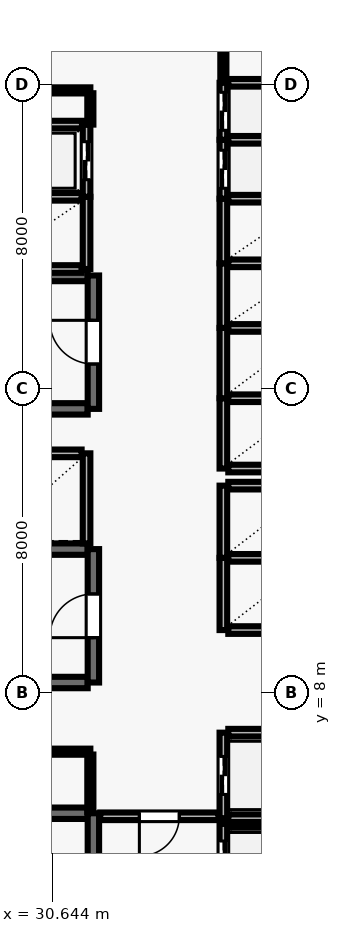
"""IFC4 building model, lengths in metres.
Left out: names, types, materials, properties, quantities, classifications, styles, units other than length and angle.
Written with IfcOpenShell. Run it as: python <this file> out.ifc"""

import sys

from ifc_helpers import new_model, si_unit, direction, frame, frame_2d, origin, place, context, subcontext, project, spatial, rectangle, extrude, element, fill, save


model = new_model("IFC4")
c1 = context("Model", 3, precision=1e-05, world=origin(), true_north=direction((0.0, 1.0)))
c2 = subcontext(c1, "Body", "Model", "MODEL_VIEW")
j1 = project(units=[si_unit("LENGTHUNIT", "METRE"), si_unit("PLANEANGLEUNIT", "RADIAN")], contexts=[c1])
p1 = place(None, origin())
s1 = spatial("IfcSite", under=j1, at=p1, CompositionType="ELEMENT")
p2 = place(p1, origin())
s2 = spatial("IfcBuilding", under=s1, at=p2, CompositionType="ELEMENT")
p3 = place(p2, frame((0.0, 0.0, 66.1)))
s3 = spatial("IfcBuildingStorey", under=s2, at=p3, CompositionType="ELEMENT", Elevation=66.1)
p4 = place(p3, frame((31.58, 4.83, 0.0), z_axis=(0.0, 0.0, 1.0), x_axis=(-1.0, 0.0, 0.0)))
e1 = element("IfcWall", 1, at=p4, inside=s3, PredefinedType="SHEAR", context=c2, shape_type="SweptSolid", body=[
    extrude(rectangle(XDim=8.36, YDim=0.3, at=frame_2d((4.18, 0.0))), origin(), (0.0, 0.0, 1.0), 3.69),
])
p5 = place(p3, frame((31.73, 0.96, 0.0), z_axis=(0.0, 0.0, 1.0), x_axis=(0.0, 1.0, 0.0)))
e2 = element("IfcWall", 2, at=p5, inside=s3, PredefinedType="SHEAR", context=c2, shape_type="SweptSolid", body=[
    extrude(rectangle(XDim=3.87, YDim=0.3, at=frame_2d((1.935, 0.0))), origin(), (0.0, 0.0, 1.0), 3.69),
])
p6 = place(p5, frame((1.54, 0.0, 0.0)))
e3 = element("IfcOpeningElement", 3, at=p6, cuts=e2, PredefinedType="OPENING", context=c2, shape_type="SweptSolid", body=[
    extrude(rectangle(XDim=1.15, YDim=2.15, at=frame_2d((0.575, 1.075))), frame((0.0, 0.16, 0.0), z_axis=(0.0, -1.0, 0.0), x_axis=(1.0, 0.0, 0.0)), (0.0, 0.0, 1.0), 0.32),
])
for number, where, z_axis, x_axis in (
    (4, (31.58, 18.98, 0.0), (0.0, 0.0, 1.0), (-1.0, 0.0, 0.0)),
    (5, (23.22, 15.47, 0.0), (0.0, 0.0, 1.0), (1.0, 0.0, 0.0)),
):
    element("IfcWall", number, at=place(p3, frame(where, z_axis=z_axis, x_axis=x_axis)), inside=s3, PredefinedType="SHEAR", context=c2, shape_type="SweptSolid", body=[
        extrude(rectangle(XDim=8.36, YDim=0.3, at=frame_2d((4.18, 0.0))), origin(), (0.0, 0.0, 1.0), 3.69),
    ])
p7 = place(p3, frame((31.73, 15.47, 0.0), z_axis=(0.0, 0.0, 1.0), x_axis=(0.0, 1.0, 0.0)))
e6 = element("IfcWall", 6, at=p7, inside=s3, PredefinedType="SHEAR", context=c2, shape_type="SweptSolid", body=[
    extrude(rectangle(XDim=3.51, YDim=0.3, at=frame_2d((1.755, 0.0))), origin(), (0.0, 0.0, 1.0), 3.69),
])
p8 = place(p7, frame((1.18, 0.0, 0.0)))
e7 = element("IfcOpeningElement", 7, at=p8, cuts=e6, PredefinedType="OPENING", context=c2, shape_type="SweptSolid", body=[
    extrude(rectangle(XDim=1.15, YDim=2.15, at=frame_2d((0.575, 1.075))), frame((0.0, 0.16, 0.0), z_axis=(0.0, -1.0, 0.0), x_axis=(1.0, 0.0, 0.0)), (0.0, 0.0, 1.0), 0.32),
])
for number, where, z_axis, x_axis in (
    (8, (31.58, 11.78, 0.0), (0.0, 0.0, 1.0), (-1.0, 0.0, 0.0)),
    (9, (23.22, 8.27, 0.0), (0.0, 0.0, 1.0), (1.0, 0.0, 0.0)),
):
    element("IfcWall", number, at=place(p3, frame(where, z_axis=z_axis, x_axis=x_axis)), inside=s3, PredefinedType="SHEAR", context=c2, shape_type="SweptSolid", body=[
        extrude(rectangle(XDim=8.36, YDim=0.3, at=frame_2d((4.18, 0.0))), origin(), (0.0, 0.0, 1.0), 3.69),
    ])
p9 = place(p3, frame((31.73, 8.27, 0.0), z_axis=(0.0, 0.0, 1.0), x_axis=(0.0, 1.0, 0.0)))
e10 = element("IfcWall", 10, at=p9, inside=s3, PredefinedType="SHEAR", context=c2, shape_type="SweptSolid", body=[
    extrude(rectangle(XDim=3.51, YDim=0.3, at=frame_2d((1.755, 0.0))), origin(), (0.0, 0.0, 1.0), 3.69),
])
p10 = place(p9, frame((1.18, 0.0, 0.0)))
e11 = element("IfcOpeningElement", 11, at=p10, cuts=e10, PredefinedType="OPENING", context=c2, shape_type="SweptSolid", body=[
    extrude(rectangle(XDim=1.15, YDim=2.15, at=frame_2d((0.575, 1.075))), frame((0.0, 0.16, 0.0), z_axis=(0.0, -1.0, 0.0), x_axis=(1.0, 0.0, 0.0)), (0.0, 0.0, 1.0), 0.32),
])
p11 = place(p3, frame((35.15, 4.55, 0.0), z_axis=(0.0, 0.0, 1.0), x_axis=(0.0, -1.0, 0.0)))
e12 = element("IfcWall", 12, at=p11, inside=s3, PredefinedType="SOLIDWALL", context=c2, shape_type="SweptSolid", body=[
    extrude(rectangle(XDim=2.1, YDim=0.2, at=frame_2d((1.05, 0.0))), origin(), (0.0, 0.0, 1.0), 3.69),
])
p12 = place(p11, frame((0.45, 0.0, 0.0)))
e13 = element("IfcOpeningElement", 13, at=p12, cuts=e12, PredefinedType="OPENING", context=c2, shape_type="SweptSolid", body=[
    extrude(rectangle(XDim=1.2, YDim=2.15, at=frame_2d((0.6, 1.075))), frame((0.0, 0.11, 0.0), z_axis=(0.0, -1.0, 0.0), x_axis=(1.0, 0.0, 0.0)), (0.0, 0.0, 1.0), 0.22),
])
p13 = place(p3, frame((37.42, 4.55, 0.0), z_axis=(0.0, 0.0, 1.0), x_axis=(-1.0, 0.0, 0.0)))
e14 = element("IfcWall", 14, at=p13, inside=s3, PredefinedType="SOLIDWALL", context=c2, shape_type="SweptSolid", body=[
    extrude(rectangle(XDim=2.14, YDim=0.2, at=frame_2d((1.07, 0.0))), origin(), (0.0, 0.0, 1.0), 3.69),
])
p14 = place(p3, frame((35.15, 6.95, 0.0), z_axis=(0.0, 0.0, 1.0), x_axis=(0.0, -1.0, 0.0)))
e15 = element("IfcWall", 15, at=p14, inside=s3, PredefinedType="SOLIDWALL", context=c2, shape_type="SweptSolid", body=[
    extrude(rectangle(XDim=2.25, YDim=0.2, at=frame_2d((1.125, 0.0))), origin(), (0.0, 0.0, 1.0), 3.69),
])
p15 = place(p14, frame((0.625, 0.0, 0.0)))
e16 = element("IfcOpeningElement", 16, at=p15, cuts=e15, PredefinedType="OPENING", context=c2, shape_type="SweptSolid", body=[
    extrude(rectangle(XDim=1.0, YDim=2.1, at=frame_2d((0.5, 1.05))), frame((0.0, 0.11, 0.0), z_axis=(0.0, -1.0, 0.0), x_axis=(1.0, 0.0, 0.0)), (0.0, 0.0, 1.0), 0.22),
])
for number, where, z_axis, x_axis in (
    (17, (35.28, 4.7, 0.0), (0.0, 0.0, 1.0), (1.0, 0.0, 0.0)),
    (18, (37.42, 6.95, 0.0), (0.0, 0.0, 1.0), (-1.0, 0.0, 0.0)),
):
    element("IfcWall", number, at=place(p3, frame(where, z_axis=z_axis, x_axis=x_axis)), inside=s3, PredefinedType="SOLIDWALL", context=c2, shape_type="SweptSolid", body=[
        extrude(rectangle(XDim=2.14, YDim=0.2, at=frame_2d((1.07, 0.0))), origin(), (0.0, 0.0, 1.0), 3.69),
    ])
p16 = place(p3, frame((35.15, 11.55, 0.0), z_axis=(0.0, 0.0, 1.0), x_axis=(0.0, -1.0, 0.0)))
e19 = element("IfcWall", 19, at=p16, inside=s3, PredefinedType="SOLIDWALL", context=c2, shape_type="SweptSolid", body=[
    extrude(rectangle(XDim=1.9, YDim=0.2, at=frame_2d((0.95, 0.0))), origin(), (0.0, 0.0, 1.0), 3.69),
])
for number, where, z_axis, x_axis in (
    (20, (35.28, 9.65, 0.0), (0.0, 0.0, 1.0), (1.0, 0.0, 0.0)),
    (21, (37.42, 11.55, 0.0), (0.0, 0.0, 1.0), (-1.0, 0.0, 0.0)),
):
    element("IfcWall", number, at=place(p3, frame(where, z_axis=z_axis, x_axis=x_axis)), inside=s3, PredefinedType="SOLIDWALL", context=c2, shape_type="SweptSolid", body=[
        extrude(rectangle(XDim=2.14, YDim=0.2, at=frame_2d((1.07, 0.0))), origin(), (0.0, 0.0, 1.0), 3.69),
    ])
p17 = place(p3, frame((35.15, 13.45, 0.0), z_axis=(0.0, 0.0, 1.0), x_axis=(0.0, -1.0, 0.0)))
e22 = element("IfcWall", 22, at=p17, inside=s3, PredefinedType="SOLIDWALL", context=c2, shape_type="SweptSolid", body=[
    extrude(rectangle(XDim=1.9, YDim=0.2, at=frame_2d((0.95, 0.0))), origin(), (0.0, 0.0, 1.0), 3.69),
])
p18 = place(p3, frame((37.42, 13.45, 0.0), z_axis=(0.0, 0.0, 1.0), x_axis=(-1.0, 0.0, 0.0)))
e23 = element("IfcWall", 23, at=p18, inside=s3, PredefinedType="SOLIDWALL", context=c2, shape_type="SweptSolid", body=[
    extrude(rectangle(XDim=2.14, YDim=0.2, at=frame_2d((1.07, 0.0))), origin(), (0.0, 0.0, 1.0), 3.69),
])
p19 = place(p3, frame((31.55, 11.93, 0.0), z_axis=(0.0, 0.0, 1.0), x_axis=(0.0, 1.0, 0.0)))
e24 = element("IfcWall", 24, at=p19, inside=s3, PredefinedType="SOLIDWALL", context=c2, shape_type="SweptSolid", body=[
    extrude(rectangle(XDim=2.37, YDim=0.2, at=frame_2d((1.185, 0.0))), origin(), (0.0, 0.0, 1.0), 3.69),
])
p20 = place(p3, frame((31.42, 14.3, 0.0), z_axis=(0.0, 0.0, 1.0), x_axis=(-1.0, 0.0, 0.0)))
e25 = element("IfcWall", 25, at=p20, inside=s3, PredefinedType="SOLIDWALL", context=c2, shape_type="SweptSolid", body=[
    extrude(rectangle(XDim=2.44, YDim=0.2, at=frame_2d((1.22, 0.0))), origin(), (0.0, 0.0, 1.0), 3.69),
])
p21 = place(p3, frame((35.15, 15.75, 0.0), z_axis=(0.0, 0.0, 1.0), x_axis=(0.0, -1.0, 0.0)))
e26 = element("IfcWall", 26, at=p21, inside=s3, PredefinedType="SOLIDWALL", context=c2, shape_type="SweptSolid", body=[
    extrude(rectangle(XDim=1.85, YDim=0.2, at=frame_2d((0.925, 0.0))), origin(), (0.0, 0.0, 1.0), 3.69),
])
for number, where, z_axis, x_axis in (
    (27, (35.28, 13.9, 0.0), (0.0, 0.0, 1.0), (1.0, 0.0, 0.0)),
    (28, (37.42, 15.75, 0.0), (0.0, 0.0, 1.0), (-1.0, 0.0, 0.0)),
):
    element("IfcWall", number, at=place(p3, frame(where, z_axis=z_axis, x_axis=x_axis)), inside=s3, PredefinedType="SOLIDWALL", context=c2, shape_type="SweptSolid", body=[
        extrude(rectangle(XDim=2.14, YDim=0.2, at=frame_2d((1.07, 0.0))), origin(), (0.0, 0.0, 1.0), 3.69),
    ])
p22 = place(p3, frame((35.15, 17.6, 0.0), z_axis=(0.0, 0.0, 1.0), x_axis=(0.0, -1.0, 0.0)))
e29 = element("IfcWall", 29, at=p22, inside=s3, PredefinedType="SOLIDWALL", context=c2, shape_type="SweptSolid", body=[
    extrude(rectangle(XDim=1.85, YDim=0.2, at=frame_2d((0.925, 0.0))), origin(), (0.0, 0.0, 1.0), 3.69),
])
p23 = place(p3, frame((37.42, 17.6, 0.0), z_axis=(0.0, 0.0, 1.0), x_axis=(-1.0, 0.0, 0.0)))
e30 = element("IfcWall", 30, at=p23, inside=s3, PredefinedType="SOLIDWALL", context=c2, shape_type="SweptSolid", body=[
    extrude(rectangle(XDim=2.14, YDim=0.2, at=frame_2d((1.07, 0.0))), origin(), (0.0, 0.0, 1.0), 3.69),
])
p24 = place(p3, frame((35.15, 19.3, 0.0), z_axis=(0.0, 0.0, 1.0), x_axis=(0.0, -1.0, 0.0)))
e31 = element("IfcWall", 31, at=p24, inside=s3, PredefinedType="SOLIDWALL", context=c2, shape_type="SweptSolid", body=[
    extrude(rectangle(XDim=1.7, YDim=0.2, at=frame_2d((0.85, 0.0))), origin(), (0.0, 0.0, 1.0), 3.69),
])
p25 = place(p3, frame((37.42, 19.3, 0.0), z_axis=(0.0, 0.0, 1.0), x_axis=(-1.0, 0.0, 0.0)))
e32 = element("IfcWall", 32, at=p25, inside=s3, PredefinedType="SOLIDWALL", context=c2, shape_type="SweptSolid", body=[
    extrude(rectangle(XDim=2.14, YDim=0.2, at=frame_2d((1.07, 0.0))), origin(), (0.0, 0.0, 1.0), 3.69),
])
p26 = place(p3, frame((35.15, 21.0, 0.0), z_axis=(0.0, 0.0, 1.0), x_axis=(0.0, -1.0, 0.0)))
e33 = element("IfcWall", 33, at=p26, inside=s3, PredefinedType="SOLIDWALL", context=c2, shape_type="SweptSolid", body=[
    extrude(rectangle(XDim=1.7, YDim=0.2, at=frame_2d((0.85, 0.0))), origin(), (0.0, 0.0, 1.0), 3.69),
])
p27 = place(p3, frame((37.42, 21.0, 0.0), z_axis=(0.0, 0.0, 1.0), x_axis=(-1.0, 0.0, 0.0)))
e34 = element("IfcWall", 34, at=p27, inside=s3, PredefinedType="SOLIDWALL", context=c2, shape_type="SweptSolid", body=[
    extrude(rectangle(XDim=2.14, YDim=0.2, at=frame_2d((1.07, 0.0))), origin(), (0.0, 0.0, 1.0), 3.69),
])
p28 = place(p3, frame((31.55, 19.15, 0.0), z_axis=(0.0, 0.0, 1.0), x_axis=(0.0, 1.0, 0.0)))
e35 = element("IfcWall", 35, at=p28, inside=s3, PredefinedType="SOLIDWALL", context=c2, shape_type="SweptSolid", body=[
    extrude(rectangle(XDim=1.9, YDim=0.2, at=frame_2d((0.95, 0.0))), origin(), (0.0, 0.0, 1.0), 3.69),
])
for number, where, z_axis, x_axis in (
    (36, (28.98, 19.15, 0.0), (0.0, 0.0, 1.0), (1.0, 0.0, 0.0)),
    (37, (31.42, 21.05, 0.0), (0.0, 0.0, 1.0), (-1.0, 0.0, 0.0)),
):
    element("IfcWall", number, at=place(p3, frame(where, z_axis=z_axis, x_axis=x_axis)), inside=s3, PredefinedType="SOLIDWALL", context=c2, shape_type="SweptSolid", body=[
        extrude(rectangle(XDim=2.44, YDim=0.2, at=frame_2d((1.22, 0.0))), origin(), (0.0, 0.0, 1.0), 3.69),
    ])
p29 = place(p3, frame((35.15, 22.55, 0.0), z_axis=(0.0, 0.0, 1.0), x_axis=(0.0, -1.0, 0.0)))
e38 = element("IfcWall", 38, at=p29, inside=s3, PredefinedType="SOLIDWALL", context=c2, shape_type="SweptSolid", body=[
    extrude(rectangle(XDim=1.55, YDim=0.2, at=frame_2d((0.775, 0.0))), origin(), (0.0, 0.0, 1.0), 3.69),
])
p30 = place(p29, frame((0.275, 0.0, 0.0)))
e39 = element("IfcOpeningElement", 39, at=p30, cuts=e38, PredefinedType="OPENING", context=c2, shape_type="SweptSolid", body=[
    extrude(rectangle(XDim=1.0, YDim=2.1, at=frame_2d((0.5, 1.05))), frame((0.0, 0.11, 0.0), z_axis=(0.0, -1.0, 0.0), x_axis=(1.0, 0.0, 0.0)), (0.0, 0.0, 1.0), 0.22),
])
p31 = place(p3, frame((37.42, 22.55, 0.0), z_axis=(0.0, 0.0, 1.0), x_axis=(-1.0, 0.0, 0.0)))
e40 = element("IfcWall", 40, at=p31, inside=s3, PredefinedType="SOLIDWALL", context=c2, shape_type="SweptSolid", body=[
    extrude(rectangle(XDim=2.14, YDim=0.2, at=frame_2d((1.07, 0.0))), origin(), (0.0, 0.0, 1.0), 3.69),
])
p32 = place(p3, frame((35.15, 24.05, 0.0), z_axis=(0.0, 0.0, 1.0), x_axis=(0.0, -1.0, 0.0)))
e41 = element("IfcWall", 41, at=p32, inside=s3, PredefinedType="SOLIDWALL", context=c2, shape_type="SweptSolid", body=[
    extrude(rectangle(XDim=1.5, YDim=0.2, at=frame_2d((0.75, 0.0))), origin(), (0.0, 0.0, 1.0), 3.69),
])
p33 = place(p32, frame((0.25, 0.0, 0.0)))
e42 = element("IfcOpeningElement", 42, at=p33, cuts=e41, PredefinedType="OPENING", context=c2, shape_type="SweptSolid", body=[
    extrude(rectangle(XDim=1.0, YDim=2.1, at=frame_2d((0.5, 1.05))), frame((0.0, 0.11, 0.0), z_axis=(0.0, -1.0, 0.0), x_axis=(1.0, 0.0, 0.0)), (0.0, 0.0, 1.0), 0.22),
])
p34 = place(p3, frame((37.42, 24.05, 0.0), z_axis=(0.0, 0.0, 1.0), x_axis=(-1.0, 0.0, 0.0)))
e43 = element("IfcWall", 43, at=p34, inside=s3, PredefinedType="SOLIDWALL", context=c2, shape_type="SweptSolid", body=[
    extrude(rectangle(XDim=2.14, YDim=0.2, at=frame_2d((1.07, 0.0))), origin(), (0.0, 0.0, 1.0), 3.69),
])
p35 = place(p3, frame((31.55, 21.05, 0.0), z_axis=(0.0, 0.0, 1.0), x_axis=(0.0, 1.0, 0.0)))
e44 = element("IfcWall", 44, at=p35, inside=s3, PredefinedType="SOLIDWALL", context=c2, shape_type="SweptSolid", body=[
    extrude(rectangle(XDim=1.9, YDim=0.2, at=frame_2d((0.95, 0.0))), origin(), (0.0, 0.0, 1.0), 3.69),
])
p36 = place(p35, frame((0.45, 0.0, 0.0)))
e45 = element("IfcOpeningElement", 45, at=p36, cuts=e44, PredefinedType="OPENING", context=c2, shape_type="SweptSolid", body=[
    extrude(rectangle(XDim=1.0, YDim=2.1, at=frame_2d((0.5, 1.05))), frame((0.0, 0.11, 0.0), z_axis=(0.0, -1.0, 0.0), x_axis=(1.0, 0.0, 0.0)), (0.0, 0.0, 1.0), 0.22),
])
p37 = place(p3, frame((31.43, 22.95, 0.0), z_axis=(0.0, 0.0, 1.0), x_axis=(-1.0, 0.0, 0.0)))
e46 = element("IfcWall", 46, at=p37, inside=s3, PredefinedType="SOLIDWALL", context=c2, shape_type="SweptSolid", body=[
    extrude(rectangle(XDim=2.46, YDim=0.2, at=frame_2d((1.23, 0.0))), origin(), (0.0, 0.0, 1.0), 3.69),
])
p38 = place(p3, frame((28.55, 6.45, 0.0), z_axis=(0.0, 0.0, 1.0), x_axis=(1.0, 0.0, 0.0)))
e47 = element("IfcWall", 47, at=p38, inside=s3, PredefinedType="PARTITIONING", context=c2, shape_type="SweptSolid", body=[
    extrude(rectangle(XDim=3.1, YDim=0.16, at=frame_2d((1.55, 0.0))), origin(), (0.0, 0.0, 1.0), 3.69),
])
p39 = place(p38, frame((1.11, 0.0, 0.0)))
e48 = element("IfcOpeningElement", 48, at=p39, cuts=e47, PredefinedType="OPENING", context=c2, shape_type="SweptSolid", body=[
    extrude(rectangle(XDim=0.88, YDim=2.1, at=frame_2d((0.44, 1.05))), frame((0.0, 0.09, 0.0), z_axis=(0.0, -1.0, 0.0), x_axis=(1.0, 0.0, 0.0)), (0.0, 0.0, 1.0), 0.18),
])
p40 = place(p3, frame((28.8, 23.85, 0.0), z_axis=(0.0, 0.0, 1.0), x_axis=(1.0, 0.0, 0.0)))
e49 = element("IfcWall", 49, at=p40, inside=s3, PredefinedType="PARTITIONING", context=c2, shape_type="SweptSolid", body=[
    extrude(rectangle(XDim=2.85, YDim=0.16, at=frame_2d((1.425, 0.0))), origin(), (0.0, 0.0, 1.0), 3.69),
])
p41 = place(p3, frame((35.02, 4.75, 0.0), z_axis=(0.0, 0.0, 1.0), x_axis=(-1.0, 0.0, 0.0)))
e50 = element("IfcWall", 50, at=p41, inside=s3, PredefinedType="SOLIDWALL", context=c2, shape_type="SweptSolid", body=[
    extrude(rectangle(XDim=3.11, YDim=0.2, at=frame_2d((1.555, 0.0))), origin(), (0.0, 0.0, 1.0), 3.69),
])
p42 = place(p41, frame((1.03, 0.0, 0.0)))
e51 = element("IfcOpeningElement", 51, at=p42, cuts=e50, PredefinedType="OPENING", context=c2, shape_type="SweptSolid", body=[
    extrude(rectangle(XDim=1.05, YDim=2.15, at=frame_2d((0.525, 1.075))), frame((0.0, 0.11, 0.0), z_axis=(0.0, -1.0, 0.0), x_axis=(1.0, 0.0, 0.0)), (0.0, 0.0, 1.0), 0.22),
])
p43 = place(p3, frame((31.65, 4.86, 0.0), z_axis=(0.0, 0.0, 1.0), x_axis=(0.0, 1.0, 0.0)))
e52 = element("IfcWall", 52, at=p43, inside=s3, PredefinedType="PARTITIONING", context=c2, shape_type="SweptSolid", body=[
    extrude(rectangle(XDim=1.515, YDim=0.16, at=frame_2d((0.757, 0.0))), origin(), (0.0, 0.0, 1.0), 3.69),
])
p44 = place(p3, frame((31.65, 23.775, 0.0), z_axis=(0.0, 0.0, 1.0), x_axis=(0.0, -1.0, 0.0)))
e53 = element("IfcWall", 53, at=p44, inside=s3, PredefinedType="PARTITIONING", context=c2, shape_type="SweptSolid", body=[
    extrude(rectangle(XDim=0.825, YDim=0.16, at=frame_2d((0.413, 0.0))), origin(), (0.0, 0.0, 1.0), 3.69),
])
p45 = place(p3, frame((35.15, 24.07, 0.0), z_axis=(0.0, 0.0, 1.0), x_axis=(0.0, 1.0, 0.0)))
e54 = element("IfcWall", 54, at=p45, inside=s3, PredefinedType="PARTITIONING", context=c2, shape_type="SweptSolid", body=[
    extrude(rectangle(XDim=1.855, YDim=0.16, at=frame_2d((0.927, 0.0))), origin(), (0.0, 0.0, 1.0), 3.69),
])
p46 = place(p8, origin())
e55 = element("IfcDoor", 55, at=p46, inside=s3, OperationType="SINGLE_SWING_RIGHT", PredefinedType="DOOR", context=c2, shape_type="SweptSolid", body=[
    extrude(rectangle(XDim=1.15, YDim=2.15, at=frame_2d((0.575, 1.075))), frame((0.0, 0.025, 0.0), z_axis=(0.0, -1.0, 0.0), x_axis=(1.0, 0.0, 0.0)), (0.0, 0.0, 1.0), 0.05),
])
fill(e7, e55)
p47 = place(p10, origin())
e56 = element("IfcDoor", 56, at=p47, inside=s3, OperationType="SINGLE_SWING_LEFT", PredefinedType="DOOR", context=c2, shape_type="SweptSolid", body=[
    extrude(rectangle(XDim=1.15, YDim=2.15, at=frame_2d((0.575, 1.075))), frame((0.0, 0.025, 0.0), z_axis=(0.0, -1.0, 0.0), x_axis=(1.0, 0.0, 0.0)), (0.0, 0.0, 1.0), 0.05),
])
fill(e11, e56)
p48 = place(p12, origin())
e57 = element("IfcDoor", 57, at=p48, inside=s3, OperationType="DOUBLE_DOOR_SLIDING", PredefinedType="DOOR", context=c2, shape_type="SweptSolid", body=[
    extrude(rectangle(XDim=1.2, YDim=2.15, at=frame_2d((0.6, 1.075))), frame((0.0, 0.025, 0.0), z_axis=(0.0, -1.0, 0.0), x_axis=(1.0, 0.0, 0.0)), (0.0, 0.0, 1.0), 0.05),
])
fill(e13, e57)
p49 = place(p15, origin())
e58 = element("IfcDoor", 58, at=p49, inside=s3, OperationType="DOUBLE_DOOR_SLIDING", PredefinedType="DOOR", context=c2, shape_type="SweptSolid", body=[
    extrude(rectangle(XDim=1.0, YDim=2.1, at=frame_2d((0.5, 1.05))), frame((0.0, 0.025, 0.0), z_axis=(0.0, -1.0, 0.0), x_axis=(1.0, 0.0, 0.0)), (0.0, 0.0, 1.0), 0.05),
])
fill(e16, e58)
p50 = place(p30, origin())
e59 = element("IfcDoor", 59, at=p50, inside=s3, OperationType="DOUBLE_DOOR_SLIDING", PredefinedType="DOOR", context=c2, shape_type="SweptSolid", body=[
    extrude(rectangle(XDim=1.0, YDim=2.1, at=frame_2d((0.5, 1.05))), frame((0.0, 0.025, 0.0), z_axis=(0.0, -1.0, 0.0), x_axis=(1.0, 0.0, 0.0)), (0.0, 0.0, 1.0), 0.05),
])
fill(e39, e59)
p51 = place(p33, origin())
e60 = element("IfcDoor", 60, at=p51, inside=s3, OperationType="DOUBLE_DOOR_SLIDING", PredefinedType="DOOR", context=c2, shape_type="SweptSolid", body=[
    extrude(rectangle(XDim=1.0, YDim=2.1, at=frame_2d((0.5, 1.05))), frame((0.0, 0.025, 0.0), z_axis=(0.0, -1.0, 0.0), x_axis=(1.0, 0.0, 0.0)), (0.0, 0.0, 1.0), 0.05),
])
fill(e42, e60)
p52 = place(p36, origin())
e61 = element("IfcDoor", 61, at=p52, inside=s3, OperationType="DOUBLE_DOOR_SLIDING", PredefinedType="DOOR", context=c2, shape_type="SweptSolid", body=[
    extrude(rectangle(XDim=1.0, YDim=2.1, at=frame_2d((0.5, 1.05))), frame((0.0, 0.025, 0.0), z_axis=(0.0, -1.0, 0.0), x_axis=(1.0, 0.0, 0.0)), (0.0, 0.0, 1.0), 0.05),
])
fill(e45, e61)
p53 = place(p42, origin())
e62 = element("IfcDoor", 62, at=p53, inside=s3, OperationType="SINGLE_SWING_RIGHT", PredefinedType="DOOR", context=c2, shape_type="SweptSolid", body=[
    extrude(rectangle(XDim=1.05, YDim=2.15, at=frame_2d((0.525, 1.075))), frame((0.0, 0.025, 0.0), z_axis=(0.0, -1.0, 0.0), x_axis=(1.0, 0.0, 0.0)), (0.0, 0.0, 1.0), 0.05),
])
fill(e51, e62)
save(model, sys.argv[1])
